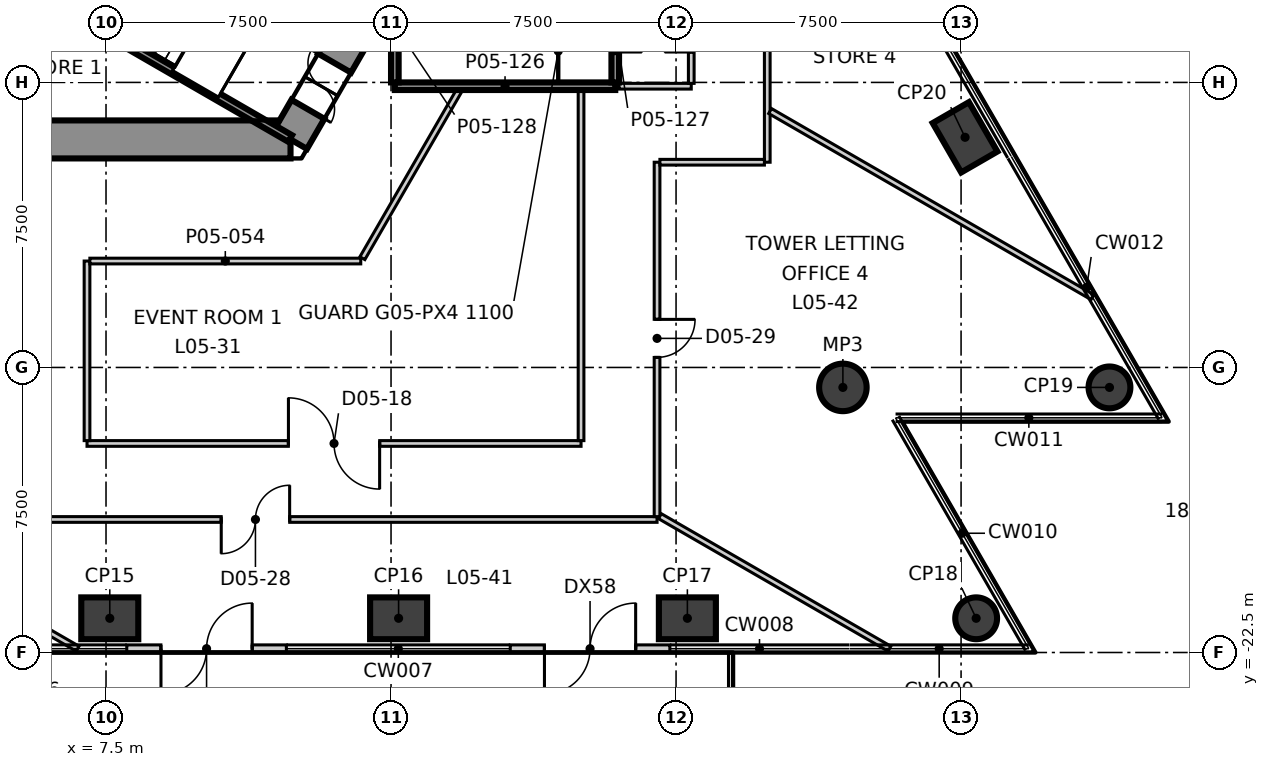
"""IFC4 building model, lengths in metres.
Left out: names, types, materials, properties, quantities, classifications, styles, units other than length and angle.
Written with IfcOpenShell. Run it as: python <this file> out.ifc"""

import sys

from ifc_helpers import new_model, si_unit, direction, frame, frame_2d, origin, origin_2d, place, context, subcontext, project, spatial, polyline, rectangle, circle, outline, extrude, element, fill, save


model = new_model("IFC4")
c1 = context("Model", 3, precision=1e-05, world=origin(), true_north=direction((0.0, 1.0)))
c2 = subcontext(c1, "Body", "Model", "MODEL_VIEW")
j1 = project(units=[si_unit("LENGTHUNIT", "METRE"), si_unit("PLANEANGLEUNIT", "RADIAN")], contexts=[c1])
p1 = place(None, origin())
s1 = spatial("IfcSite", under=j1, at=p1, CompositionType="ELEMENT")
p2 = place(p1, origin())
s2 = spatial("IfcBuilding", under=s1, at=p2, CompositionType="ELEMENT")
p3 = place(p2, frame((0.0, 0.0, 30.3)))
s3 = spatial("IfcBuildingStorey", under=s2, at=p3, CompositionType="ELEMENT", Elevation=30.3)
p4 = place(p3, frame((-12.355, -9.0, -0.4), z_axis=(0.0, 0.0, 1.0), x_axis=(1.0, 0.0, 0.0)))
e1 = element("IfcWall", 1, at=p4, inside=s3, PredefinedType="SHEAR", context=c2, shape_type="SweptSolid", body=[
    extrude(outline(polyline([(-0.289, -0.5), (1.656, -0.5), (3.601, -0.5), (5.547, -0.5), (7.492, -0.5), (9.437, -0.5), (11.382, -0.5), (13.328, -0.5), (15.273, -0.5), (17.218, -0.5), (19.163, -0.5), (21.109, -0.5), (23.054, -0.5), (24.999, -0.5), (24.422, 0.5), (22.566, 0.5), (20.709, 0.5), (18.853, 0.5), (16.996, 0.5), (15.14, 0.5), (13.283, 0.5), (11.427, 0.5), (9.57, 0.5), (7.714, 0.5), (5.857, 0.5), (4.001, 0.5), (2.145, 0.5), (0.288, 0.5), (-0.289, -0.5)])), origin(), (0.0, 0.0, 1.0), 5.1),
])
p5 = place(p3, frame((12.355, -9.0, -0.4), z_axis=(0.0, 0.0, 1.0), x_axis=(0.500077567175, 0.865980615723, 0.0)))
e2 = element("IfcWall", 2, at=p5, inside=s3, PredefinedType="SHEAR", context=c2, shape_type="SweptSolid", body=[
    extrude(outline(polyline([(-0.288, -0.5), (1.617, -0.5), (3.522, -0.5), (2.945, 0.5), (1.617, 0.5), (0.289, 0.499), (-0.288, -0.5)])), origin(), (0.0, 0.0, 1.0), 5.1),
])
p6 = place(p5, frame((0.917, 0.0, 0.4)))
e3 = element("IfcOpeningElement", 3, at=p6, cuts=e2, PredefinedType="OPENING", context=c2, shape_type="SweptSolid", body=[
    extrude(rectangle(XDim=1.4, YDim=2.1, at=frame_2d((0.7, 1.05))), frame((0.0, 0.51, 0.0), z_axis=(0.0, -1.0, 0.0), x_axis=(1.0, 0.0, 0.0)), (0.0, 0.0, 1.0), 1.02),
])
for number, where, z_axis, x_axis in (
    (4, (7.599, -21.6, -0.4), (0.0, 0.0, 1.0), (1.0, 0.0, 0.0)),
    (5, (15.199, -21.6, -0.4), (0.0, 0.0, 1.0), (1.0, 0.0, 0.0)),
    (6, (22.798, -21.6, -0.4), (0.0, 0.0, 1.0), (1.0, 0.0, 0.0)),
):
    element("IfcColumn", number, at=place(p3, frame(where, z_axis=z_axis, x_axis=x_axis)), inside=s3, PredefinedType="COLUMN", context=c2, shape_type="SweptSolid", body=[
        extrude(rectangle(XDim=1.5, YDim=1.1, at=origin_2d()), origin(), (0.0, 0.0, 1.0), 5.1),
    ])
for number, where, z_axis, x_axis in (
    (7, (30.397, -21.6, -0.4), (0.0, 0.0, 1.0), (1.0, 0.0, 0.0)),
    (8, (33.905, -15.525, -0.4), (0.0, 0.0, 1.0), (-0.5, 0.866, 0.0)),
):
    element("IfcColumn", number, at=place(p3, frame(where, z_axis=z_axis, x_axis=x_axis)), inside=s3, PredefinedType="COLUMN", context=c2, shape_type="SweptSolid", body=[
        extrude(circle(Radius=0.55, at=origin_2d()), origin(), (0.0, 0.0, 1.0), 5.1),
    ])
p7 = place(p3, frame((30.105, -8.944, -0.4), z_axis=(0.0, 0.0, 1.0), x_axis=(-0.5, 0.866025403784, 0.0)))
e9 = element("IfcColumn", 9, at=p7, inside=s3, PredefinedType="COLUMN", context=c2, shape_type="SweptSolid", body=[
    extrude(rectangle(XDim=1.5, YDim=1.1, at=origin_2d()), origin(), (0.0, 0.0, 1.0), 5.1),
])
p8 = place(p3, frame((26.89, -15.525, -0.4), z_axis=(0.0, 0.0, 1.0), x_axis=(1.0, 0.0, 0.0)))
e10 = element("IfcColumn", 10, at=p8, inside=s3, PredefinedType="COLUMN", context=c2, shape_type="SweptSolid", body=[
    extrude(circle(Radius=0.625, at=origin_2d()), origin(), (0.0, 0.0, 1.0), 5.1),
])
p9 = place(p3, frame((8.046, -22.4, 0.0), z_axis=(0.0, 0.0, 1.0), x_axis=(1.0, 0.0, 0.0)))
e11 = element("IfcWall", 11, at=p9, inside=s3, PredefinedType="ELEMENTEDWALL", context=c2, shape_type="SweptSolid", body=[
    extrude(rectangle(XDim=4.2, YDim=0.2, at=frame_2d((2.1, 0.0))), origin(), (0.0, 0.0, 1.0), 4.7),
])
p10 = place(p9, frame((0.9, 0.0, 0.0)))
e12 = element("IfcOpeningElement", 12, at=p10, cuts=e11, PredefinedType="OPENING", context=c2, shape_type="SweptSolid", body=[
    extrude(rectangle(XDim=2.4, YDim=2.4, at=frame_2d((1.2, 1.2))), frame((0.0, 0.11, 0.0), z_axis=(0.0, -1.0, 0.0), x_axis=(1.0, 0.0, 0.0)), (0.0, 0.0, 1.0), 0.22),
])
p11 = place(p3, frame((18.137, -22.4, 0.0), z_axis=(0.0, 0.0, 1.0), x_axis=(1.0, 0.0, 0.0)))
e13 = element("IfcWall", 13, at=p11, inside=s3, PredefinedType="ELEMENTEDWALL", context=c2, shape_type="SweptSolid", body=[
    extrude(rectangle(XDim=4.2, YDim=0.2, at=frame_2d((2.1, 0.0))), origin(), (0.0, 0.0, 1.0), 4.7),
])
p12 = place(p11, frame((0.9, 0.0, 0.0)))
e14 = element("IfcOpeningElement", 14, at=p12, cuts=e13, PredefinedType="OPENING", context=c2, shape_type="SweptSolid", body=[
    extrude(rectangle(XDim=2.4, YDim=2.4, at=frame_2d((1.2, 1.2))), frame((0.0, 0.11, 0.0), z_axis=(0.0, -1.0, 0.0), x_axis=(1.0, 0.0, 0.0)), (0.0, 0.0, 1.0), 0.22),
])
p13 = place(p3, frame((21.0, -7.6, 0.0), z_axis=(0.0, 0.0, 1.0), x_axis=(1.0, 0.0, 0.0)))
e15 = element("IfcWall", 15, at=p13, inside=s3, PredefinedType="PARTITIONING", context=c2, shape_type="SweptSolid", body=[
    extrude(rectangle(XDim=1.9, YDim=0.15, at=frame_2d((0.95, 0.0))), origin(), (0.0, 0.0, 1.0), 4.7),
])
p14 = place(p3, frame((22.9, -7.525, 0.0), z_axis=(0.0, 0.0, 1.0), x_axis=(0.0, 1.0, 0.0)))
e16 = element("IfcWall", 16, at=p14, inside=s3, PredefinedType="PARTITIONING", context=c2, shape_type="SweptSolid", body=[
    extrude(rectangle(XDim=3.05, YDim=0.15, at=frame_2d((1.525, 0.0))), origin(), (0.0, 0.0, 1.0), 4.7),
])
p15 = place(p14, frame((0.825, 0.0, 0.0)))
e17 = element("IfcOpeningElement", 17, at=p15, cuts=e16, PredefinedType="OPENING", context=c2, shape_type="SweptSolid", body=[
    extrude(rectangle(XDim=1.4, YDim=2.1, at=frame_2d((0.7, 1.05))), frame((0.0, 0.085, 0.0), z_axis=(0.0, -1.0, 0.0), x_axis=(1.0, 0.0, 0.0)), (0.0, 0.0, 1.0), 0.17),
])
p16 = place(p3, frame((-12.647, -19.0, 0.0), z_axis=(0.0, 0.0, 1.0), x_axis=(1.0, 0.0, 0.0)))
e18 = element("IfcWall", 18, at=p16, inside=s3, PredefinedType="PARTITIONING", context=c2, shape_type="SweptSolid", body=[
    extrude(rectangle(XDim=34.647, YDim=0.15, at=frame_2d((17.323, 0.0))), origin(), (0.0, 0.0, 1.0), 4.7),
])
p17 = place(p16, frame((6.256, 0.0, 0.0)))
e19 = element("IfcOpeningElement", 19, at=p17, cuts=e18, PredefinedType="OPENING", context=c2, shape_type="SweptSolid", body=[
    extrude(rectangle(XDim=1.0, YDim=2.1, at=frame_2d((0.5, 1.05))), frame((0.0, 0.085, 0.0), z_axis=(0.0, -1.0, 0.0), x_axis=(1.0, 0.0, 0.0)), (0.0, 0.0, 1.0), 0.17),
])
p18 = place(p16, frame((23.179, 0.0, 0.0)))
e20 = element("IfcOpeningElement", 20, at=p18, cuts=e18, PredefinedType="OPENING", context=c2, shape_type="SweptSolid", body=[
    extrude(rectangle(XDim=1.8, YDim=2.1, at=frame_2d((0.9, 1.05))), frame((0.0, 0.085, 0.0), z_axis=(0.0, -1.0, 0.0), x_axis=(1.0, 0.0, 0.0)), (0.0, 0.0, 1.0), 0.17),
])
p19 = place(p3, frame((22.0, -18.925, 0.0), z_axis=(0.0, 0.0, 1.0), x_axis=(0.0, 1.0, 0.0)))
e21 = element("IfcWall", 21, at=p19, inside=s3, PredefinedType="PARTITIONING", context=c2, shape_type="SweptSolid", body=[
    extrude(rectangle(XDim=9.325, YDim=0.15, at=frame_2d((4.663, 0.0))), origin(), (0.0, 0.0, 1.0), 4.7),
])
p20 = place(p19, frame((4.19, 0.0, 0.0)))
e22 = element("IfcOpeningElement", 22, at=p20, cuts=e21, PredefinedType="OPENING", context=c2, shape_type="SweptSolid", body=[
    extrude(rectangle(XDim=1.0, YDim=2.1, at=frame_2d((0.5, 1.05))), frame((0.0, 0.085, 0.0), z_axis=(0.0, -1.0, 0.0), x_axis=(1.0, 0.0, 0.0)), (0.0, 0.0, 1.0), 0.17),
])
p21 = place(p3, frame((0.994, -19.075, 0.0), z_axis=(0.0, 0.0, 1.0), x_axis=(0.866027239912, -0.49999681972, 0.0)))
e23 = element("IfcWall", 23, at=p21, inside=s3, PredefinedType="PARTITIONING", context=c2, shape_type="SweptSolid", body=[
    extrude(rectangle(XDim=6.65, YDim=0.15, at=frame_2d((3.325, 0.0))), origin(), (0.0, 0.0, 1.0), 4.7),
])
p22 = place(p3, frame((7.0, -17.0, 0.0), z_axis=(0.0, 0.0, 1.0), x_axis=(1.0, 0.0, 0.0)))
e24 = element("IfcWall", 24, at=p22, inside=s3, PredefinedType="PARTITIONING", context=c2, shape_type="SweptSolid", body=[
    extrude(rectangle(XDim=13.0, YDim=0.15, at=frame_2d((6.5, 0.0))), origin(), (0.0, 0.0, 1.0), 4.7),
])
p23 = place(p22, frame((5.3, 0.0, 0.0)))
e25 = element("IfcOpeningElement", 25, at=p23, cuts=e24, PredefinedType="OPENING", context=c2, shape_type="SweptSolid", body=[
    extrude(rectangle(XDim=2.4, YDim=2.1, at=frame_2d((1.2, 1.05))), frame((0.0, 0.085, 0.0), z_axis=(0.0, -1.0, 0.0), x_axis=(1.0, 0.0, 0.0)), (0.0, 0.0, 1.0), 0.17),
])
p24 = place(p3, frame((20.0, -16.925, 0.0), z_axis=(0.0, 0.0, 1.0), x_axis=(0.0, 1.0, 0.0)))
e26 = element("IfcWall", 26, at=p24, inside=s3, PredefinedType="PARTITIONING", context=c2, shape_type="SweptSolid", body=[
    extrude(rectangle(XDim=9.225, YDim=0.15, at=frame_2d((4.613, 0.0))), origin(), (0.0, 0.0, 1.0), 4.7),
])
p25 = place(p3, frame((7.0, -16.925, 0.0), z_axis=(0.0, 0.0, 1.0), x_axis=(0.0, 1.0, 0.0)))
e27 = element("IfcWall", 27, at=p25, inside=s3, PredefinedType="PARTITIONING", context=c2, shape_type="SweptSolid", body=[
    extrude(rectangle(XDim=4.725, YDim=0.15, at=frame_2d((2.363, 0.0))), origin(), (0.0, 0.0, 1.0), 4.7),
])
p26 = place(p3, frame((7.075, -12.2, 0.0), z_axis=(0.0, 0.0, 1.0), x_axis=(1.0, 0.0, 0.0)))
e28 = element("IfcWall", 28, at=p26, inside=s3, PredefinedType="PARTITIONING", context=c2, shape_type="SweptSolid", body=[
    extrude(rectangle(XDim=7.128, YDim=0.15, at=frame_2d((3.564, 0.0))), origin(), (0.0, 0.0, 1.0), 4.7),
])
p27 = place(p3, frame((14.246, -12.125, 0.0), z_axis=(0.0, 0.0, 1.0), x_axis=(0.500018862428, 0.866014513283, 0.0)))
e29 = element("IfcWall", 29, at=p27, inside=s3, PredefinedType="PARTITIONING", context=c2, shape_type="SweptSolid", body=[
    extrude(rectangle(XDim=5.11, YDim=0.15, at=frame_2d((2.555, 0.0))), origin(), (0.0, 0.0, 1.0), 4.7),
])
p28 = place(p3, frame((24.9, -9.6, 0.0), z_axis=(0.0, 0.0, 1.0), x_axis=(0.0, 1.0, 0.0)))
e30 = element("IfcWall", 30, at=p28, inside=s3, PredefinedType="PARTITIONING", context=c2, shape_type="SweptSolid", body=[
    extrude(rectangle(XDim=7.125, YDim=0.15, at=frame_2d((3.562, 0.0))), origin(), (0.0, 0.0, 1.0), 4.7),
])
p29 = place(p3, frame((22.075, -9.6, 0.0), z_axis=(0.0, 0.0, 1.0), x_axis=(1.0, 0.0, 0.0)))
e31 = element("IfcWall", 31, at=p29, inside=s3, PredefinedType="PARTITIONING", context=c2, shape_type="SweptSolid", body=[
    extrude(rectangle(XDim=2.75, YDim=0.15, at=frame_2d((1.375, 0.0))), origin(), (0.0, 0.0, 1.0), 4.7),
])
p30 = place(p3, frame((22.075, -18.913, 0.0), z_axis=(0.0, 0.0, 1.0), x_axis=(0.866050347742, -0.499956793309, 0.0)))
e32 = element("IfcWall", 32, at=p30, inside=s3, PredefinedType="PARTITIONING", context=c2, shape_type="SweptSolid", body=[
    extrude(rectangle(XDim=6.974, YDim=0.15, at=frame_2d((3.487, 0.0))), origin(), (0.0, 0.0, 1.0), 4.7),
])
p31 = place(p3, frame((24.975, -8.253, 0.0), z_axis=(0.0, 0.0, 1.0), x_axis=(0.866010428405, -0.500025937221, 0.0)))
e33 = element("IfcWall", 33, at=p31, inside=s3, PredefinedType="PARTITIONING", context=c2, shape_type="SweptSolid", body=[
    extrude(rectangle(XDim=9.795, YDim=0.15, at=frame_2d((4.898, 0.0))), origin(), (0.0, 0.0, 1.0), 4.7),
])
p32 = place(p3, frame((4.929, -4.693, 0.0), z_axis=(0.0, 0.0, 1.0), x_axis=(0.865987152174, -0.50006624788, 0.0)))
e34 = element("IfcWall", 34, at=p32, inside=s3, PredefinedType="SOLIDWALL", context=c2, shape_type="SweptSolid", body=[
    extrude(rectangle(XDim=8.565, YDim=0.2, at=frame_2d((4.282, 0.0))), origin(), (0.0, 0.0, 1.0), 4.7),
])
p33 = place(p3, frame((15.1, -7.6, 0.0), z_axis=(0.0, 0.0, 1.0), x_axis=(1.0, 0.0, 0.0)))
e35 = element("IfcWall", 35, at=p33, inside=s3, PredefinedType="SOLIDWALL", context=c2, shape_type="SweptSolid", body=[
    extrude(rectangle(XDim=5.8, YDim=0.2, at=frame_2d((2.9, 0.0))), origin(), (0.0, 0.0, 1.0), 4.7),
])
p34 = place(p3, frame((20.9, -7.5, 0.0), z_axis=(0.0, 0.0, 1.0), x_axis=(0.0, 1.0, 0.0)))
e36 = element("IfcWall", 36, at=p34, inside=s3, PredefinedType="SOLIDWALL", context=c2, shape_type="SweptSolid", body=[
    extrude(rectangle(XDim=3.0, YDim=0.2, at=frame_2d((1.5, 0.0))), origin(), (0.0, 0.0, 1.0), 4.7),
])
p35 = place(p34, frame((0.8, 0.0, 0.0)))
e37 = element("IfcOpeningElement", 37, at=p35, cuts=e36, PredefinedType="OPENING", context=c2, shape_type="SweptSolid", body=[
    extrude(rectangle(XDim=1.4, YDim=2.1, at=frame_2d((0.7, 1.05))), frame((0.0, 0.11, 0.0), z_axis=(0.0, -1.0, 0.0), x_axis=(1.0, 0.0, 0.0)), (0.0, 0.0, 1.0), 0.22),
])
p36 = place(p3, frame((15.1, -7.5, 0.0), z_axis=(0.0, 0.0, 1.0), x_axis=(0.0, 1.0, 0.0)))
e38 = element("IfcWall", 38, at=p36, inside=s3, PredefinedType="SOLIDWALL", context=c2, shape_type="SweptSolid", body=[
    extrude(rectangle(XDim=3.0, YDim=0.2, at=frame_2d((1.5, 0.0))), origin(), (0.0, 0.0, 1.0), 4.7),
])
p37 = place(p10, frame((2.4, 0.0, 0.0), z_axis=(0.0, 0.0, 1.0), x_axis=(-1.0, 0.0, 0.0)))
e39 = element("IfcDoor", 39, at=p37, inside=s3, OperationType="DOUBLE_DOOR_SINGLE_SWING", PredefinedType="DOOR", context=c2, shape_type="SweptSolid", body=[
    extrude(rectangle(XDim=2.4, YDim=2.4, at=frame_2d((1.2, 1.2))), frame((0.0, 0.025, 0.0), z_axis=(0.0, -1.0, 0.0), x_axis=(1.0, 0.0, 0.0)), (0.0, 0.0, 1.0), 0.05),
])
fill(e12, e39)
p38 = place(p12, frame((2.4, 0.0, 0.0), z_axis=(0.0, 0.0, 1.0), x_axis=(-1.0, 0.0, 0.0)))
e40 = element("IfcDoor", 40, at=p38, inside=s3, OperationType="DOUBLE_DOOR_SINGLE_SWING", PredefinedType="DOOR", context=c2, shape_type="SweptSolid", body=[
    extrude(rectangle(XDim=2.4, YDim=2.4, at=frame_2d((1.2, 1.2))), frame((0.0, 0.025, 0.0), z_axis=(0.0, -1.0, 0.0), x_axis=(1.0, 0.0, 0.0)), (0.0, 0.0, 1.0), 0.05),
])
fill(e14, e40)
p39 = place(p23, origin())
e41 = element("IfcDoor", 41, at=p39, inside=s3, OperationType="DOUBLE_DOOR_SINGLE_SWING", PredefinedType="DOOR", context=c2, shape_type="SweptSolid", body=[
    extrude(rectangle(XDim=2.4, YDim=2.1, at=frame_2d((1.2, 1.05))), frame((0.0, 0.025, 0.0), z_axis=(0.0, -1.0, 0.0), x_axis=(1.0, 0.0, 0.0)), (0.0, 0.0, 1.0), 0.05),
])
fill(e25, e41)
p40 = place(p18, origin())
e42 = element("IfcDoor", 42, at=p40, inside=s3, OperationType="DOUBLE_DOOR_SINGLE_SWING", PredefinedType="DOOR", context=c2, shape_type="SweptSolid", body=[
    extrude(rectangle(XDim=1.8, YDim=2.1, at=frame_2d((0.9, 1.05))), frame((0.0, 0.025, 0.0), z_axis=(0.0, -1.0, 0.0), x_axis=(1.0, 0.0, 0.0)), (0.0, 0.0, 1.0), 0.05),
])
fill(e20, e42)
p41 = place(p20, origin())
e43 = element("IfcDoor", 43, at=p41, inside=s3, OperationType="SINGLE_SWING_RIGHT", PredefinedType="DOOR", context=c2, shape_type="SweptSolid", body=[
    extrude(rectangle(XDim=1.0, YDim=2.1, at=frame_2d((0.5, 1.05))), frame((0.0, 0.025, 0.0), z_axis=(0.0, -1.0, 0.0), x_axis=(1.0, 0.0, 0.0)), (0.0, 0.0, 1.0), 0.05),
])
fill(e22, e43)
p42 = place(p6, origin())
e44 = element("IfcDoor", 44, at=p42, inside=s3, OperationType="DOUBLE_DOOR_SINGLE_SWING", PredefinedType="DOOR", context=c2, shape_type="SweptSolid", body=[
    extrude(rectangle(XDim=1.4, YDim=2.1, at=frame_2d((0.7, 1.05))), frame((0.0, 0.025, 0.0), z_axis=(0.0, -1.0, 0.0), x_axis=(1.0, 0.0, 0.0)), (0.0, 0.0, 1.0), 0.05),
])
fill(e3, e44)
save(model, sys.argv[1])
